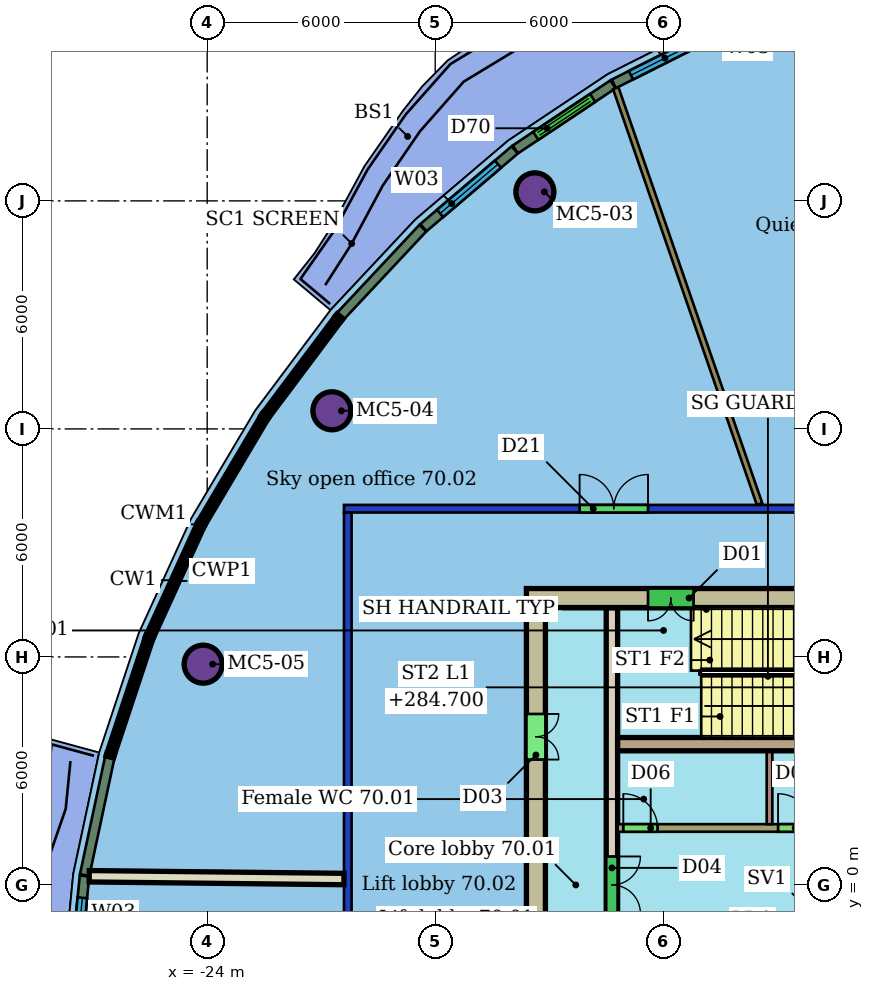
"""IFC4 building model, lengths in metres.
Left out: names, types, materials, properties, quantities, classifications, styles, units other than length and angle.
Written with IfcOpenShell. Run it as: python <this file> out.ifc"""

import sys

from ifc_helpers import new_model, si_unit, direction, frame, frame_2d, origin, origin_2d, place, context, subcontext, project, spatial, rectangle, hollow_circle, extrude, element, fill, save


model = new_model("IFC4")
c1 = context("Model", 3, precision=1e-05, world=origin(), true_north=direction((0.0, 1.0)))
c2 = subcontext(c1, "Body", "Model", "MODEL_VIEW")
j1 = project(units=[si_unit("LENGTHUNIT", "METRE"), si_unit("PLANEANGLEUNIT", "RADIAN")], contexts=[c1])
p1 = place(None, origin())
s1 = spatial("IfcSite", under=j1, at=p1, CompositionType="ELEMENT")
p2 = place(p1, origin())
s2 = spatial("IfcBuilding", under=s1, at=p2, CompositionType="ELEMENT")
p3 = place(p2, frame((0.0, 0.0, 282.9)))
s3 = spatial("IfcBuildingStorey", under=s2, at=p3, CompositionType="ELEMENT", Elevation=282.9)
for number, where, z_axis, x_axis in (
    (1, (-15.377, 18.238, 0.0), (0.0, 0.0, 1.0), (1.0, 0.0, 0.0)),
    (2, (-20.718, 12.477, 0.0), (0.0, 0.0, 1.0), (1.0, 0.0, 0.0)),
    (3, (-24.106, 5.81, 0.0), (0.0, 0.0, 1.0), (1.0, 0.0, 0.0)),
):
    element("IfcColumn", number, at=place(p3, frame(where, z_axis=z_axis, x_axis=x_axis)), inside=s3, PredefinedType="COLUMN", context=c2, shape_type="SweptSolid", body=[
        extrude(hollow_circle(Radius=0.5, WallThickness=0.04, at=origin_2d()), origin(), (0.0, 0.0, 1.0), 3.45),
    ])
p4 = place(p3, frame((-20.3, -9.8, 0.0), z_axis=(0.0, 0.0, 1.0), x_axis=(0.0, 1.0, 0.0)))
e4 = element("IfcWall", 4, at=p4, inside=s3, PredefinedType="PARTITIONING", context=c2, shape_type="SweptSolid", body=[
    extrude(rectangle(XDim=19.6, YDim=0.2, at=frame_2d((9.8, 0.0))), origin(), (0.0, 0.0, 1.0), 3.1),
])
p5 = place(p4, frame((5.449, 0.0, 0.0)))
e5 = element("IfcOpeningElement", 5, at=p5, cuts=e4, PredefinedType="OPENING", context=c2, shape_type="SweptSolid", body=[
    extrude(rectangle(XDim=1.8, YDim=2.4, at=frame_2d((0.9, 1.2))), frame((0.0, 0.11, 0.0), z_axis=(0.0, -1.0, 0.0), x_axis=(1.0, 0.0, 0.0)), (0.0, 0.0, 1.0), 0.22),
])
p6 = place(p3, frame((-20.4, 9.9, 0.0), z_axis=(0.0, 0.0, 1.0), x_axis=(1.0, 0.0, 0.0)))
e6 = element("IfcWall", 6, at=p6, inside=s3, PredefinedType="PARTITIONING", context=c2, shape_type="SweptSolid", body=[
    extrude(rectangle(XDim=28.8, YDim=0.2, at=frame_2d((14.4, 0.0))), origin(), (0.0, 0.0, 1.0), 3.1),
])
p7 = place(p6, frame((12.36, 0.0, 0.0)))
e7 = element("IfcOpeningElement", 7, at=p7, cuts=e6, PredefinedType="OPENING", context=c2, shape_type="SweptSolid", body=[
    extrude(rectangle(XDim=0.9, YDim=2.1, at=frame_2d((0.45, 1.05))), frame((0.0, 0.11, 0.0), z_axis=(0.0, -1.0, 0.0), x_axis=(1.0, 0.0, 0.0)), (0.0, 0.0, 1.0), 0.22),
])
p8 = place(p6, frame((6.2, 0.0, 0.0)))
e8 = element("IfcOpeningElement", 8, at=p8, cuts=e6, PredefinedType="OPENING", context=c2, shape_type="SweptSolid", body=[
    extrude(rectangle(XDim=1.8, YDim=2.1, at=frame_2d((0.9, 1.05))), frame((0.0, 0.11, 0.0), z_axis=(0.0, -1.0, 0.0), x_axis=(1.0, 0.0, 0.0)), (0.0, 0.0, 1.0), 0.22),
])
p9 = place(p6, frame((18.669, 0.0, 0.0)))
e9 = element("IfcOpeningElement", 9, at=p9, cuts=e6, PredefinedType="OPENING", context=c2, shape_type="SweptSolid", body=[
    extrude(rectangle(XDim=1.0, YDim=2.1, at=frame_2d((0.5, 1.05))), frame((0.0, 0.11, 0.0), z_axis=(0.0, -1.0, 0.0), x_axis=(1.0, 0.0, 0.0)), (0.0, 0.0, 1.0), 0.22),
])
p10 = place(p3, frame((-13.249, 20.965, 0.0), z_axis=(0.0, 0.0, 1.0), x_axis=(0.32678024546, -0.945100349792, 0.0)))
e10 = element("IfcWall", 10, at=p10, inside=s3, PredefinedType="PARTITIONING", context=c2, shape_type="SweptSolid", body=[
    extrude(rectangle(XDim=11.576, YDim=0.15, at=frame_2d((5.788, 0.0))), origin(), (0.0, 0.0, 1.0), 3.45),
])
p11 = place(p3, frame((-27.104, 0.229, 0.0), z_axis=(0.0, 0.0, 1.0), x_axis=(0.999941086317, -0.010854671562, 0.0)))
e11 = element("IfcWall", 11, at=p11, inside=s3, PredefinedType="PARTITIONING", context=c2, shape_type="SweptSolid", body=[
    extrude(rectangle(XDim=6.703, YDim=0.3, at=frame_2d((3.351, 0.0))), origin(), (0.0, 0.0, 1.0), 3.45),
])
p12 = place(p3, frame((-10.61, 22.432, 0.0), z_axis=(0.0, 0.0, 1.0), x_axis=(-0.893387281144, -0.449287397875, 0.0)))
e12 = element("IfcWall", 12, at=p12, inside=s3, PredefinedType="SOLIDWALL", context=c2, shape_type="SweptSolid", body=[
    extrude(rectangle(XDim=3.012, YDim=0.25, at=frame_2d((1.506, 0.0))), origin(), (0.0, 0.0, 1.0), 3.15),
])
p13 = place(p12, frame((0.506, 0.0, 0.9)))
e13 = element("IfcOpeningElement", 13, at=p13, cuts=e12, PredefinedType="OPENING", context=c2, shape_type="SweptSolid", body=[
    extrude(rectangle(XDim=2.0, YDim=2.1, at=frame_2d((1.0, 1.05))), frame((0.0, 0.135, 0.0), z_axis=(0.0, -1.0, 0.0), x_axis=(1.0, 0.0, 0.0)), (0.0, 0.0, 1.0), 0.27),
])
p14 = place(p3, frame((-13.321, 21.067, 0.0), z_axis=(0.0, 0.0, 1.0), x_axis=(-0.831965133189, -0.554827916707, 0.0)))
e14 = element("IfcWall", 14, at=p14, inside=s3, PredefinedType="SOLIDWALL", context=c2, shape_type="SweptSolid", body=[
    extrude(rectangle(XDim=3.088, YDim=0.25, at=frame_2d((1.544, 0.0))), origin(), (0.0, 0.0, 1.0), 3.15),
])
p15 = place(p14, frame((0.644, 0.0, 0.0)))
e15 = element("IfcOpeningElement", 15, at=p15, cuts=e14, PredefinedType="OPENING", context=c2, shape_type="SweptSolid", body=[
    extrude(rectangle(XDim=1.8, YDim=2.4, at=frame_2d((0.9, 1.2))), frame((0.0, 0.135, 0.0), z_axis=(0.0, -1.0, 0.0), x_axis=(1.0, 0.0, 0.0)), (0.0, 0.0, 1.0), 0.27),
])
p16 = place(p3, frame((-15.908, 19.34, 0.0), z_axis=(0.0, 0.0, 1.0), x_axis=(-0.761601165005, -0.64804603653, 0.0)))
e16 = element("IfcWall", 16, at=p16, inside=s3, PredefinedType="SOLIDWALL", context=c2, shape_type="SweptSolid", body=[
    extrude(rectangle(XDim=3.154, YDim=0.25, at=frame_2d((1.577, 0.0))), origin(), (0.0, 0.0, 1.0), 3.15),
])
p17 = place(p16, frame((0.577, 0.0, 0.9)))
e17 = element("IfcOpeningElement", 17, at=p17, cuts=e16, PredefinedType="OPENING", context=c2, shape_type="SweptSolid", body=[
    extrude(rectangle(XDim=2.0, YDim=2.1, at=frame_2d((1.0, 1.05))), frame((0.0, 0.135, 0.0), z_axis=(0.0, -1.0, 0.0), x_axis=(1.0, 0.0, 0.0)), (0.0, 0.0, 1.0), 0.27),
])
for number, where, z_axis, x_axis in (
    (18, (-18.326, 17.281, 0.0), (0.0, 0.0, 1.0), (-0.684, -0.73, 0.0)),
    (19, (-26.564, 3.353, 0.0), (0.0, 0.0, 1.0), (-0.209, -0.978, 0.0)),
):
    element("IfcWall", number, at=place(p3, frame(where, z_axis=z_axis, x_axis=x_axis)), inside=s3, PredefinedType="SOLIDWALL", context=c2, shape_type="SweptSolid", body=[
        extrude(rectangle(XDim=3.163, YDim=0.25, at=frame_2d((1.582, 0.0))), origin(), (0.0, 0.0, 1.0), 3.15),
    ])
p18 = place(p3, frame((-27.228, 0.238, 0.0), z_axis=(0.0, 0.0, 1.0), x_axis=(-0.097526326892, -0.995232945377, 0.0)))
e20 = element("IfcWall", 20, at=p18, inside=s3, PredefinedType="SOLIDWALL", context=c2, shape_type="SweptSolid", body=[
    extrude(rectangle(XDim=3.154, YDim=0.25, at=frame_2d((1.577, 0.0))), origin(), (0.0, 0.0, 1.0), 3.15),
])
p19 = place(p18, frame((0.577, 0.0, 0.9)))
e21 = element("IfcOpeningElement", 21, at=p19, cuts=e20, PredefinedType="OPENING", context=c2, shape_type="SweptSolid", body=[
    extrude(rectangle(XDim=2.0, YDim=2.1, at=frame_2d((1.0, 1.05))), frame((0.0, 0.135, 0.0), z_axis=(0.0, -1.0, 0.0), x_axis=(1.0, 0.0, 0.0)), (0.0, 0.0, 1.0), 0.27),
])
p20 = place(p3, frame((-6.0, 7.55, 0.0), z_axis=(0.0, 0.0, 1.0), x_axis=(-1.0, 0.0, 0.0)))
e22 = element("IfcWall", 22, at=p20, inside=s3, PredefinedType="SHEAR", context=c2, shape_type="SweptSolid", body=[
    extrude(rectangle(XDim=9.6, YDim=0.5, at=frame_2d((4.8, 0.0))), origin(), (0.0, 0.0, 1.0), 3.3),
])
p21 = place(p20, frame((5.2, 0.0, 0.0)))
e23 = element("IfcOpeningElement", 23, at=p21, cuts=e22, PredefinedType="OPENING", context=c2, shape_type="SweptSolid", body=[
    extrude(rectangle(XDim=1.2, YDim=2.1, at=frame_2d((0.6, 1.05))), frame((0.0, 0.26, 0.0), z_axis=(0.0, -1.0, 0.0), x_axis=(1.0, 0.0, 0.0)), (0.0, 0.0, 1.0), 0.52),
])
p22 = place(p3, frame((-15.35, 7.3, 0.0), z_axis=(0.0, 0.0, 1.0), x_axis=(0.0, -1.0, 0.0)))
e24 = element("IfcWall", 24, at=p22, inside=s3, PredefinedType="SHEAR", context=c2, shape_type="SweptSolid", body=[
    extrude(rectangle(XDim=14.6, YDim=0.5, at=frame_2d((7.3, 0.0))), origin(), (0.0, 0.0, 1.0), 3.3),
])
p23 = place(p22, frame((10.6, 0.0, 0.0)))
e25 = element("IfcOpeningElement", 25, at=p23, cuts=e24, PredefinedType="OPENING", context=c2, shape_type="SweptSolid", body=[
    extrude(rectangle(XDim=1.2, YDim=2.1, at=frame_2d((0.6, 1.05))), frame((0.0, 0.26, 0.0), z_axis=(0.0, -1.0, 0.0), x_axis=(1.0, 0.0, 0.0)), (0.0, 0.0, 1.0), 0.52),
])
p24 = place(p22, frame((2.8, 0.0, 0.0)))
e26 = element("IfcOpeningElement", 26, at=p24, cuts=e24, PredefinedType="OPENING", context=c2, shape_type="SweptSolid", body=[
    extrude(rectangle(XDim=1.2, YDim=2.1, at=frame_2d((0.6, 1.05))), frame((0.0, 0.26, 0.0), z_axis=(0.0, -1.0, 0.0), x_axis=(1.0, 0.0, 0.0)), (0.0, 0.0, 1.0), 0.52),
])
p25 = place(p3, frame((-13.2, 3.705, 0.0), z_axis=(0.0, 0.0, 1.0), x_axis=(1.0, 0.0, 0.0)))
e27 = element("IfcWall", 27, at=p25, inside=s3, PredefinedType="SHEAR", context=c2, shape_type="SweptSolid", body=[
    extrude(rectangle(XDim=7.2, YDim=0.35, at=frame_2d((3.6, 0.0))), origin(), (0.0, 0.0, 1.0), 3.3),
])
p26 = place(p3, frame((-13.35, 7.3, 0.0), z_axis=(0.0, 0.0, 1.0), x_axis=(0.0, -1.0, 0.0)))
e28 = element("IfcWall", 28, at=p26, inside=s3, PredefinedType="SHEAR", context=c2, shape_type="SweptSolid", body=[
    extrude(rectangle(XDim=14.6, YDim=0.3, at=frame_2d((7.3, 0.0))), origin(), (0.0, 0.0, 1.0), 3.3),
])
p27 = place(p26, frame((6.55, 0.0, 0.0)))
e29 = element("IfcOpeningElement", 29, at=p27, cuts=e28, PredefinedType="OPENING", context=c2, shape_type="SweptSolid", body=[
    extrude(rectangle(XDim=1.5, YDim=2.1, at=frame_2d((0.75, 1.05))), frame((0.0, 0.16, 0.0), z_axis=(0.0, -1.0, 0.0), x_axis=(1.0, 0.0, 0.0)), (0.0, 0.0, 1.0), 0.32),
])
p28 = place(p3, frame((-13.2, 1.5, 0.0), z_axis=(0.0, 0.0, 1.0), x_axis=(1.0, 0.0, 0.0)))
e30 = element("IfcWall", 30, at=p28, inside=s3, PredefinedType="SHEAR", context=c2, shape_type="SweptSolid", body=[
    extrude(rectangle(XDim=14.4, YDim=0.2, at=frame_2d((7.2, 0.0))), origin(), (0.0, 0.0, 1.0), 3.3),
])
p29 = place(p28, frame((10.312, 0.0, 0.0)))
e31 = element("IfcOpeningElement", 31, at=p29, cuts=e30, PredefinedType="OPENING", context=c2, shape_type="SweptSolid", body=[
    extrude(rectangle(XDim=1.1, YDim=2.1, at=frame_2d((0.55, 1.05))), frame((0.0, 0.11, 0.0), z_axis=(0.0, -1.0, 0.0), x_axis=(1.0, 0.0, 0.0)), (0.0, 0.0, 1.0), 0.22),
])
p30 = place(p28, frame((12.754, 0.0, 0.0)))
e32 = element("IfcOpeningElement", 32, at=p30, cuts=e30, PredefinedType="OPENING", context=c2, shape_type="SweptSolid", body=[
    extrude(rectangle(XDim=1.1, YDim=2.1, at=frame_2d((0.55, 1.05))), frame((0.0, 0.11, 0.0), z_axis=(0.0, -1.0, 0.0), x_axis=(1.0, 0.0, 0.0)), (0.0, 0.0, 1.0), 0.22),
])
p31 = place(p28, frame((0.15, 0.0, 0.0)))
e33 = element("IfcOpeningElement", 33, at=p31, cuts=e30, PredefinedType="OPENING", context=c2, shape_type="SweptSolid", body=[
    extrude(rectangle(XDim=0.9, YDim=2.1, at=frame_2d((0.45, 1.05))), frame((0.0, 0.11, 0.0), z_axis=(0.0, -1.0, 0.0), x_axis=(1.0, 0.0, 0.0)), (0.0, 0.0, 1.0), 0.22),
])
p32 = place(p28, frame((4.222, 0.0, 0.0)))
e34 = element("IfcOpeningElement", 34, at=p32, cuts=e30, PredefinedType="OPENING", context=c2, shape_type="SweptSolid", body=[
    extrude(rectangle(XDim=0.9, YDim=2.1, at=frame_2d((0.45, 1.05))), frame((0.0, 0.11, 0.0), z_axis=(0.0, -1.0, 0.0), x_axis=(1.0, 0.0, 0.0)), (0.0, 0.0, 1.0), 0.22),
])
p33 = place(p28, frame((8.367, 0.0, 0.0)))
e35 = element("IfcOpeningElement", 35, at=p33, cuts=e30, PredefinedType="OPENING", context=c2, shape_type="SweptSolid", body=[
    extrude(rectangle(XDim=1.0, YDim=2.1, at=frame_2d((0.5, 1.05))), frame((0.0, 0.11, 0.0), z_axis=(0.0, -1.0, 0.0), x_axis=(1.0, 0.0, 0.0)), (0.0, 0.0, 1.0), 0.22),
])
p34 = place(p3, frame((-9.203, 1.6, 0.0), z_axis=(0.0, 0.0, 1.0), x_axis=(0.0, 1.0, 0.0)))
e36 = element("IfcWall", 36, at=p34, inside=s3, PredefinedType="PARTITIONING", context=c2, shape_type="SweptSolid", body=[
    extrude(rectangle(XDim=1.93, YDim=0.15, at=frame_2d((0.965, 0.0))), origin(), (0.0, 0.0, 1.0), 3.3),
])
p35 = place(p8, origin())
e37 = element("IfcDoor", 37, at=p35, inside=s3, OperationType="DOUBLE_DOOR_SINGLE_SWING", PredefinedType="DOOR", context=c2, shape_type="SweptSolid", body=[
    extrude(rectangle(XDim=1.8, YDim=2.1, at=frame_2d((0.9, 1.05))), frame((0.0, 0.025, 0.0), z_axis=(0.0, -1.0, 0.0), x_axis=(1.0, 0.0, 0.0)), (0.0, 0.0, 1.0), 0.05),
])
fill(e8, e37)
p36 = place(p13, origin())
e38 = element("IfcWindow", 38, at=p36, inside=s3, PartitioningType="SINGLE_PANEL", PredefinedType="WINDOW", context=c2, shape_type="SweptSolid", body=[
    extrude(rectangle(XDim=2.0, YDim=2.1, at=frame_2d((1.0, 1.05))), frame((0.0, 0.03, 0.0), z_axis=(0.0, -1.0, 0.0), x_axis=(1.0, 0.0, 0.0)), (0.0, 0.0, 1.0), 0.06),
])
fill(e13, e38)
p37 = place(p15, origin())
e39 = element("IfcDoor", 39, at=p37, inside=s3, OperationType="DOUBLE_DOOR_SLIDING", PredefinedType="DOOR", context=c2, shape_type="SweptSolid", body=[
    extrude(rectangle(XDim=1.8, YDim=2.4, at=frame_2d((0.9, 1.2))), frame((0.0, 0.025, 0.0), z_axis=(0.0, -1.0, 0.0), x_axis=(1.0, 0.0, 0.0)), (0.0, 0.0, 1.0), 0.05),
])
fill(e15, e39)
p38 = place(p17, origin())
e40 = element("IfcWindow", 40, at=p38, inside=s3, PartitioningType="SINGLE_PANEL", PredefinedType="WINDOW", context=c2, shape_type="SweptSolid", body=[
    extrude(rectangle(XDim=2.0, YDim=2.1, at=frame_2d((1.0, 1.05))), frame((0.0, 0.03, 0.0), z_axis=(0.0, -1.0, 0.0), x_axis=(1.0, 0.0, 0.0)), (0.0, 0.0, 1.0), 0.06),
])
fill(e17, e40)
p39 = place(p19, origin())
e41 = element("IfcWindow", 41, at=p39, inside=s3, PartitioningType="SINGLE_PANEL", PredefinedType="WINDOW", context=c2, shape_type="SweptSolid", body=[
    extrude(rectangle(XDim=2.0, YDim=2.1, at=frame_2d((1.0, 1.05))), frame((0.0, 0.03, 0.0), z_axis=(0.0, -1.0, 0.0), x_axis=(1.0, 0.0, 0.0)), (0.0, 0.0, 1.0), 0.06),
])
fill(e21, e41)
p40 = place(p21, origin())
e42 = element("IfcDoor", 42, at=p40, inside=s3, OperationType="DOUBLE_DOOR_SINGLE_SWING", PredefinedType="NOTDEFINED", context=c2, shape_type="SweptSolid", body=[
    extrude(rectangle(XDim=1.2, YDim=2.1, at=frame_2d((0.6, 1.05))), frame((0.0, 0.025, 0.0), z_axis=(0.0, -1.0, 0.0), x_axis=(1.0, 0.0, 0.0)), (0.0, 0.0, 1.0), 0.05),
])
fill(e23, e42)
p41 = place(p24, origin())
e43 = element("IfcDoor", 43, at=p41, inside=s3, OperationType="DOUBLE_DOOR_SINGLE_SWING", PredefinedType="NOTDEFINED", context=c2, shape_type="SweptSolid", body=[
    extrude(rectangle(XDim=1.2, YDim=2.1, at=frame_2d((0.6, 1.05))), frame((0.0, 0.025, 0.0), z_axis=(0.0, -1.0, 0.0), x_axis=(1.0, 0.0, 0.0)), (0.0, 0.0, 1.0), 0.05),
])
fill(e26, e43)
p42 = place(p27, origin())
e44 = element("IfcDoor", 44, at=p42, inside=s3, OperationType="DOUBLE_DOOR_SINGLE_SWING", PredefinedType="NOTDEFINED", context=c2, shape_type="SweptSolid", body=[
    extrude(rectangle(XDim=1.5, YDim=2.1, at=frame_2d((0.75, 1.05))), frame((0.0, 0.025, 0.0), z_axis=(0.0, -1.0, 0.0), x_axis=(1.0, 0.0, 0.0)), (0.0, 0.0, 1.0), 0.05),
])
fill(e29, e44)
p43 = place(p31, origin())
e45 = element("IfcDoor", 45, at=p43, inside=s3, OperationType="SINGLE_SWING_LEFT", PredefinedType="NOTDEFINED", context=c2, shape_type="SweptSolid", body=[
    extrude(rectangle(XDim=0.9, YDim=2.1, at=frame_2d((0.45, 1.05))), frame((0.0, 0.025, 0.0), z_axis=(0.0, -1.0, 0.0), x_axis=(1.0, 0.0, 0.0)), (0.0, 0.0, 1.0), 0.05),
])
fill(e33, e45)
p44 = place(p32, origin())
e46 = element("IfcDoor", 46, at=p44, inside=s3, OperationType="SINGLE_SWING_LEFT", PredefinedType="NOTDEFINED", context=c2, shape_type="SweptSolid", body=[
    extrude(rectangle(XDim=0.9, YDim=2.1, at=frame_2d((0.45, 1.05))), frame((0.0, 0.025, 0.0), z_axis=(0.0, -1.0, 0.0), x_axis=(1.0, 0.0, 0.0)), (0.0, 0.0, 1.0), 0.05),
])
fill(e34, e46)
save(model, sys.argv[1])
